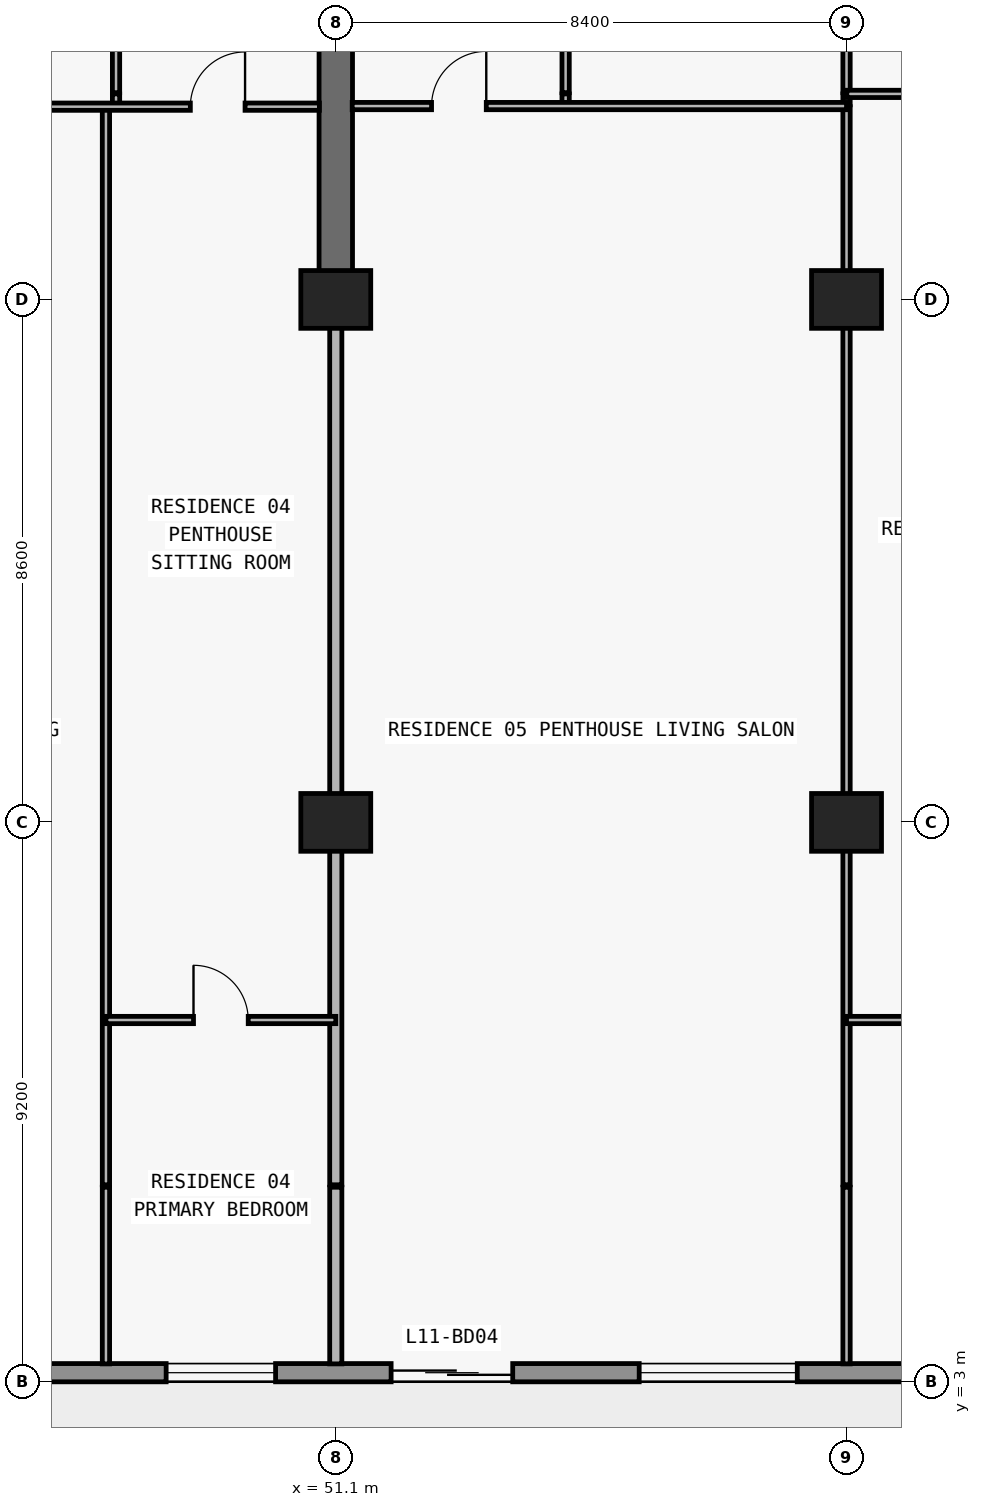
"""IFC4 building model, lengths in metres.
Left out: names, types, materials, properties, quantities, classifications, styles, units other than length and angle.
Written with IfcOpenShell. Run it as: python <this file> out.ifc"""

import sys

from ifc_helpers import new_model, si_unit, direction, frame, frame_2d, origin, origin_2d, place, context, subcontext, project, spatial, rectangle, extrude, element, fill, save


model = new_model("IFC4")
c1 = context("Model", 3, precision=1e-05, world=origin(), true_north=direction((0.0, 1.0)))
c2 = subcontext(c1, "Body", "Model", "MODEL_VIEW")
j1 = project(units=[si_unit("LENGTHUNIT", "METRE"), si_unit("PLANEANGLEUNIT", "RADIAN")], contexts=[c1])
p1 = place(None, origin())
s1 = spatial("IfcSite", under=j1, at=p1, CompositionType="ELEMENT")
p2 = place(p1, origin())
s2 = spatial("IfcBuilding", under=s1, at=p2, CompositionType="ELEMENT")
p3 = place(p2, frame((0.0, 0.0, 46.5)))
s3 = spatial("IfcBuildingStorey", under=s2, at=p3, CompositionType="ELEMENT", Elevation=46.5)
for number, where, z_axis, x_axis in (
    (1, (51.1, 12.2, 0.0), (0.0, 0.0, 1.0), (1.0, 0.0, 0.0)),
    (2, (59.5, 12.2, 0.0), (0.0, 0.0, 1.0), (1.0, 0.0, 0.0)),
    (3, (51.1, 20.8, 0.0), (0.0, 0.0, 1.0), (1.0, 0.0, 0.0)),
    (4, (59.5, 20.8, 0.0), (0.0, 0.0, 1.0), (1.0, 0.0, 0.0)),
):
    element("IfcColumn", number, at=place(p3, frame(where, z_axis=z_axis, x_axis=x_axis)), inside=s3, PredefinedType="COLUMN", context=c2, shape_type="SweptSolid", body=[
        extrude(rectangle(XDim=1.15, YDim=0.95, at=origin_2d()), origin(), (0.0, 0.0, 1.0), 3.05),
    ])
p4 = place(p3, frame((51.1, 20.8, 0.0), z_axis=(0.0, 0.0, 1.0), x_axis=(0.0, 1.0, 0.0)))
e5 = element("IfcWall", 5, at=p4, inside=s3, PredefinedType="SHEAR", context=c2, shape_type="SweptSolid", body=[
    extrude(rectangle(XDim=8.6, YDim=0.55, at=frame_2d((4.3, 0.0))), origin(), (0.0, 0.0, 1.0), 3.05),
])
p5 = place(p3, frame((72.7, 3.15, 0.0), z_axis=(0.0, 0.0, 1.0), x_axis=(-1.0, 0.0, 0.0)))
e6 = element("IfcWall", 6, at=p5, inside=s3, PredefinedType="STANDARD", context=c2, shape_type="SweptSolid", body=[
    extrude(rectangle(XDim=67.6, YDim=0.3, at=frame_2d((33.8, 0.0))), origin(), (0.0, 0.0, 1.0), 3.05),
])
p6 = place(p5, frame((59.89, 0.0, 0.0)))
e7 = element("IfcOpeningElement", 7, at=p6, cuts=e6, PredefinedType="OPENING", context=c2, shape_type="SweptSolid", body=[
    extrude(rectangle(XDim=2.0, YDim=2.3, at=frame_2d((1.0, 1.15))), frame((0.0, 0.16, 0.0), z_axis=(0.0, -1.0, 0.0), x_axis=(1.0, 0.0, 0.0)), (0.0, 0.0, 1.0), 0.32),
])
p7 = place(p5, frame((55.21, 0.0, 0.65)))
e8 = element("IfcOpeningElement", 8, at=p7, cuts=e6, PredefinedType="OPENING", context=c2, shape_type="SweptSolid", body=[
    extrude(rectangle(XDim=2.6, YDim=1.85, at=frame_2d((1.3, 0.925))), frame((0.0, 0.16, 0.0), z_axis=(0.0, -1.0, 0.0), x_axis=(1.0, 0.0, 0.0)), (0.0, 0.0, 1.0), 0.32),
])
p8 = place(p5, frame((49.1, 0.0, 0.85)))
e9 = element("IfcOpeningElement", 9, at=p8, cuts=e6, PredefinedType="OPENING", context=c2, shape_type="SweptSolid", body=[
    extrude(rectangle(XDim=2.2, YDim=1.55, at=frame_2d((1.1, 0.775))), frame((0.0, 0.16, 0.0), z_axis=(0.0, -1.0, 0.0), x_axis=(1.0, 0.0, 0.0)), (0.0, 0.0, 1.0), 0.32),
])
p9 = place(p5, frame((42.69, 0.0, 0.0)))
e10 = element("IfcOpeningElement", 10, at=p9, cuts=e6, PredefinedType="OPENING", context=c2, shape_type="SweptSolid", body=[
    extrude(rectangle(XDim=2.0, YDim=2.3, at=frame_2d((1.0, 1.15))), frame((0.0, 0.16, 0.0), z_axis=(0.0, -1.0, 0.0), x_axis=(1.0, 0.0, 0.0)), (0.0, 0.0, 1.0), 0.32),
])
p10 = place(p5, frame((38.59, 0.0, 0.85)))
e11 = element("IfcOpeningElement", 11, at=p10, cuts=e6, PredefinedType="OPENING", context=c2, shape_type="SweptSolid", body=[
    extrude(rectangle(XDim=1.8, YDim=1.55, at=frame_2d((0.9, 0.775))), frame((0.0, 0.16, 0.0), z_axis=(0.0, -1.0, 0.0), x_axis=(1.0, 0.0, 0.0)), (0.0, 0.0, 1.0), 0.32),
])
p11 = place(p5, frame((30.914, 0.0, 0.85)))
e12 = element("IfcOpeningElement", 12, at=p11, cuts=e6, PredefinedType="OPENING", context=c2, shape_type="SweptSolid", body=[
    extrude(rectangle(XDim=2.2, YDim=1.55, at=frame_2d((1.1, 0.775))), frame((0.0, 0.16, 0.0), z_axis=(0.0, -1.0, 0.0), x_axis=(1.0, 0.0, 0.0)), (0.0, 0.0, 1.0), 0.32),
])
p12 = place(p5, frame((26.69, 0.0, 0.0)))
e13 = element("IfcOpeningElement", 13, at=p12, cuts=e6, PredefinedType="OPENING", context=c2, shape_type="SweptSolid", body=[
    extrude(rectangle(XDim=2.0, YDim=2.3, at=frame_2d((1.0, 1.15))), frame((0.0, 0.16, 0.0), z_axis=(0.0, -1.0, 0.0), x_axis=(1.0, 0.0, 0.0)), (0.0, 0.0, 1.0), 0.32),
])
p13 = place(p5, frame((22.59, 0.0, 0.85)))
e14 = element("IfcOpeningElement", 14, at=p13, cuts=e6, PredefinedType="OPENING", context=c2, shape_type="SweptSolid", body=[
    extrude(rectangle(XDim=1.8, YDim=1.55, at=frame_2d((0.9, 0.775))), frame((0.0, 0.16, 0.0), z_axis=(0.0, -1.0, 0.0), x_axis=(1.0, 0.0, 0.0)), (0.0, 0.0, 1.0), 0.32),
])
p14 = place(p5, frame((18.69, 0.0, 0.0)))
e15 = element("IfcOpeningElement", 15, at=p14, cuts=e6, PredefinedType="OPENING", context=c2, shape_type="SweptSolid", body=[
    extrude(rectangle(XDim=2.0, YDim=2.3, at=frame_2d((1.0, 1.15))), frame((0.0, 0.16, 0.0), z_axis=(0.0, -1.0, 0.0), x_axis=(1.0, 0.0, 0.0)), (0.0, 0.0, 1.0), 0.32),
])
p15 = place(p5, frame((14.01, 0.0, 0.65)))
e16 = element("IfcOpeningElement", 16, at=p15, cuts=e6, PredefinedType="OPENING", context=c2, shape_type="SweptSolid", body=[
    extrude(rectangle(XDim=2.6, YDim=1.85, at=frame_2d((1.3, 0.925))), frame((0.0, 0.16, 0.0), z_axis=(0.0, -1.0, 0.0), x_axis=(1.0, 0.0, 0.0)), (0.0, 0.0, 1.0), 0.32),
])
p16 = place(p5, frame((7.9, 0.0, 0.85)))
e17 = element("IfcOpeningElement", 17, at=p16, cuts=e6, PredefinedType="OPENING", context=c2, shape_type="SweptSolid", body=[
    extrude(rectangle(XDim=2.2, YDim=1.55, at=frame_2d((1.1, 0.775))), frame((0.0, 0.16, 0.0), z_axis=(0.0, -1.0, 0.0), x_axis=(1.0, 0.0, 0.0)), (0.0, 0.0, 1.0), 0.32),
])
p17 = place(p3, frame((47.32, 3.295, 0.0), z_axis=(0.0, 0.0, 1.0), x_axis=(0.0, 1.0, 0.0)))
e18 = element("IfcWall", 18, at=p17, inside=s3, PredefinedType="PARTITIONING", context=c2, shape_type="SweptSolid", body=[
    extrude(rectangle(XDim=2.905, YDim=0.12, at=frame_2d((1.453, 0.0))), origin(), (0.0, 0.0, 1.0), 3.05),
])
p18 = place(p3, frame((47.32, 6.24, 0.0), z_axis=(0.0, 0.0, 1.0), x_axis=(0.0, 1.0, 0.0)))
e19 = element("IfcWall", 19, at=p18, inside=s3, PredefinedType="PARTITIONING", context=c2, shape_type="SweptSolid", body=[
    extrude(rectangle(XDim=17.73, YDim=0.12, at=frame_2d((8.865, 0.0))), origin(), (0.0, 0.0, 1.0), 3.05),
])
p19 = place(p3, frame((47.486, 24.0, 0.0), z_axis=(0.0, 0.0, 1.0), x_axis=(0.0, 1.0, 0.0)))
e20 = element("IfcWall", 20, at=p19, inside=s3, PredefinedType="PARTITIONING", context=c2, shape_type="SweptSolid", body=[
    extrude(rectangle(XDim=0.18, YDim=0.12, at=frame_2d((0.09, 0.0))), origin(), (0.0, 0.0, 1.0), 3.05),
])
p20 = place(p3, frame((47.486, 24.2, 0.0), z_axis=(0.0, 0.0, 1.0), x_axis=(0.0, 1.0, 0.0)))
e21 = element("IfcWall", 21, at=p20, inside=s3, PredefinedType="PARTITIONING", context=c2, shape_type="SweptSolid", body=[
    extrude(rectangle(XDim=4.38, YDim=0.12, at=frame_2d((2.19, 0.0))), origin(), (0.0, 0.0, 1.0), 3.05),
])
p21 = place(p20, frame((1.74, 0.0, 0.0)))
e22 = element("IfcOpeningElement", 22, at=p21, cuts=e21, PredefinedType="OPENING", context=c2, shape_type="SweptSolid", body=[
    extrude(rectangle(XDim=0.9, YDim=2.15, at=frame_2d((0.45, 1.075))), frame((0.0, 0.07, 0.0), z_axis=(0.0, -1.0, 0.0), x_axis=(1.0, 0.0, 0.0)), (0.0, 0.0, 1.0), 0.14),
])
p22 = place(p3, frame((51.1, 3.295, 0.0), z_axis=(0.0, 0.0, 1.0), x_axis=(0.0, 1.0, 0.0)))
e23 = element("IfcWall", 23, at=p22, inside=s3, PredefinedType="PARTITIONING", context=c2, shape_type="SweptSolid", body=[
    extrude(rectangle(XDim=2.905, YDim=0.2, at=frame_2d((1.453, 0.0))), origin(), (0.0, 0.0, 1.0), 3.05),
])
p23 = place(p3, frame((51.1, 6.24, 0.0), z_axis=(0.0, 0.0, 1.0), x_axis=(0.0, 1.0, 0.0)))
e24 = element("IfcWall", 24, at=p23, inside=s3, PredefinedType="PARTITIONING", context=c2, shape_type="SweptSolid", body=[
    extrude(rectangle(XDim=14.555, YDim=0.2, at=frame_2d((7.277, 0.0))), origin(), (0.0, 0.0, 1.0), 2.11),
])
p24 = place(p3, frame((54.88, 24.0, 0.0), z_axis=(0.0, 0.0, 1.0), x_axis=(0.0, 1.0, 0.0)))
e25 = element("IfcWall", 25, at=p24, inside=s3, PredefinedType="PARTITIONING", context=c2, shape_type="SweptSolid", body=[
    extrude(rectangle(XDim=0.18, YDim=0.12, at=frame_2d((0.09, 0.0))), origin(), (0.0, 0.0, 1.0), 3.05),
])
p25 = place(p3, frame((54.88, 24.2, 0.0), z_axis=(0.0, 0.0, 1.0), x_axis=(0.0, 1.0, 0.0)))
e26 = element("IfcWall", 26, at=p25, inside=s3, PredefinedType="PARTITIONING", context=c2, shape_type="SweptSolid", body=[
    extrude(rectangle(XDim=4.38, YDim=0.12, at=frame_2d((2.19, 0.0))), origin(), (0.0, 0.0, 1.0), 3.05),
])
p26 = place(p25, frame((1.74, 0.0, 0.0)))
e27 = element("IfcOpeningElement", 27, at=p26, cuts=e26, PredefinedType="OPENING", context=c2, shape_type="SweptSolid", body=[
    extrude(rectangle(XDim=0.9, YDim=2.15, at=frame_2d((0.45, 1.075))), frame((0.0, 0.07, 0.0), z_axis=(0.0, -1.0, 0.0), x_axis=(1.0, 0.0, 0.0)), (0.0, 0.0, 1.0), 0.14),
])
p27 = place(p3, frame((59.5, 3.295, 0.0), z_axis=(0.0, 0.0, 1.0), x_axis=(0.0, 1.0, 0.0)))
e28 = element("IfcWall", 28, at=p27, inside=s3, PredefinedType="PARTITIONING", context=c2, shape_type="SweptSolid", body=[
    extrude(rectangle(XDim=2.905, YDim=0.12, at=frame_2d((1.453, 0.0))), origin(), (0.0, 0.0, 1.0), 3.05),
])
p28 = place(p3, frame((59.5, 6.24, 0.0), z_axis=(0.0, 0.0, 1.0), x_axis=(0.0, 1.0, 0.0)))
e29 = element("IfcWall", 29, at=p28, inside=s3, PredefinedType="PARTITIONING", context=c2, shape_type="SweptSolid", body=[
    extrude(rectangle(XDim=17.73, YDim=0.12, at=frame_2d((8.865, 0.0))), origin(), (0.0, 0.0, 1.0), 2.11),
])
p29 = place(p3, frame((59.5, 24.0, 0.0), z_axis=(0.0, 0.0, 1.0), x_axis=(0.0, 1.0, 0.0)))
e30 = element("IfcWall", 30, at=p29, inside=s3, PredefinedType="PARTITIONING", context=c2, shape_type="SweptSolid", body=[
    extrude(rectangle(XDim=0.18, YDim=0.12, at=frame_2d((0.09, 0.0))), origin(), (0.0, 0.0, 1.0), 2.11),
])
p30 = place(p3, frame((59.5, 24.2, 0.0), z_axis=(0.0, 0.0, 1.0), x_axis=(0.0, 1.0, 0.0)))
e31 = element("IfcWall", 31, at=p30, inside=s3, PredefinedType="PARTITIONING", context=c2, shape_type="SweptSolid", body=[
    extrude(rectangle(XDim=4.38, YDim=0.12, at=frame_2d((2.19, 0.0))), origin(), (0.0, 0.0, 1.0), 2.11),
])
p31 = place(p30, frame((1.74, 0.0, 0.0)))
e32 = element("IfcOpeningElement", 32, at=p31, cuts=e31, PredefinedType="OPENING", context=c2, shape_type="SweptSolid", body=[
    extrude(rectangle(XDim=0.9, YDim=2.06, at=frame_2d((0.45, 1.03))), frame((0.0, 0.07, 0.0), z_axis=(0.0, -1.0, 0.0), x_axis=(1.0, 0.0, 0.0)), (0.0, 0.0, 1.0), 0.14),
])
p32 = place(p3, frame((47.32, 8.95, 0.0), z_axis=(0.0, 0.0, 1.0), x_axis=(1.0, 0.0, 0.0)))
e33 = element("IfcWall", 33, at=p32, inside=s3, PredefinedType="PARTITIONING", context=c2, shape_type="SweptSolid", body=[
    extrude(rectangle(XDim=3.78, YDim=0.12, at=frame_2d((1.89, 0.0))), origin(), (0.0, 0.0, 1.0), 3.05),
])
p33 = place(p32, frame((1.44, 0.0, 0.0)))
e34 = element("IfcOpeningElement", 34, at=p33, cuts=e33, PredefinedType="OPENING", context=c2, shape_type="SweptSolid", body=[
    extrude(rectangle(XDim=0.9, YDim=2.15, at=frame_2d((0.45, 1.075))), frame((0.0, 0.07, 0.0), z_axis=(0.0, -1.0, 0.0), x_axis=(1.0, 0.0, 0.0)), (0.0, 0.0, 1.0), 0.14),
])
p34 = place(p3, frame((59.5, 8.95, 0.0), z_axis=(0.0, 0.0, 1.0), x_axis=(1.0, 0.0, 0.0)))
e35 = element("IfcWall", 35, at=p34, inside=s3, PredefinedType="PARTITIONING", context=c2, shape_type="SweptSolid", body=[
    extrude(rectangle(XDim=8.4, YDim=0.12, at=frame_2d((4.2, 0.0))), origin(), (0.0, 0.0, 1.0), 3.05),
])
p35 = place(p34, frame((3.75, 0.0, 0.0)))
e36 = element("IfcOpeningElement", 36, at=p35, cuts=e35, PredefinedType="OPENING", context=c2, shape_type="SweptSolid", body=[
    extrude(rectangle(XDim=0.9, YDim=2.15, at=frame_2d((0.45, 1.075))), frame((0.0, 0.07, 0.0), z_axis=(0.0, -1.0, 0.0), x_axis=(1.0, 0.0, 0.0)), (0.0, 0.0, 1.0), 0.14),
])
p36 = place(p3, frame((42.7, 23.97, 0.0), z_axis=(0.0, 0.0, 1.0), x_axis=(1.0, 0.0, 0.0)))
e37 = element("IfcWall", 37, at=p36, inside=s3, PredefinedType="PARTITIONING", context=c2, shape_type="SweptSolid", body=[
    extrude(rectangle(XDim=8.13, YDim=0.12, at=frame_2d((4.065, 0.0))), origin(), (0.0, 0.0, 1.0), 3.05),
])
p37 = place(p36, frame((1.86, 0.0, 0.0)))
e38 = element("IfcOpeningElement", 38, at=p37, cuts=e37, PredefinedType="OPENING", context=c2, shape_type="SweptSolid", body=[
    extrude(rectangle(XDim=0.9, YDim=2.15, at=frame_2d((0.45, 1.075))), frame((0.0, 0.07, 0.0), z_axis=(0.0, -1.0, 0.0), x_axis=(1.0, 0.0, 0.0)), (0.0, 0.0, 1.0), 0.14),
])
p38 = place(p36, frame((6.008, 0.0, 0.0)))
e39 = element("IfcOpeningElement", 39, at=p38, cuts=e37, PredefinedType="OPENING", context=c2, shape_type="SweptSolid", body=[
    extrude(rectangle(XDim=0.9, YDim=2.15, at=frame_2d((0.45, 1.075))), frame((0.0, 0.07, 0.0), z_axis=(0.0, -1.0, 0.0), x_axis=(1.0, 0.0, 0.0)), (0.0, 0.0, 1.0), 0.14),
])
p39 = place(p3, frame((51.37, 23.98, 0.0), z_axis=(0.0, 0.0, 1.0), x_axis=(1.0, 0.0, 0.0)))
e40 = element("IfcWall", 40, at=p39, inside=s3, PredefinedType="PARTITIONING", context=c2, shape_type="SweptSolid", body=[
    extrude(rectangle(XDim=8.13, YDim=0.12, at=frame_2d((4.065, 0.0))), origin(), (0.0, 0.0, 1.0), 3.05),
])
p40 = place(p39, frame((1.305, 0.0, 0.0)))
e41 = element("IfcOpeningElement", 41, at=p40, cuts=e40, PredefinedType="OPENING", context=c2, shape_type="SweptSolid", body=[
    extrude(rectangle(XDim=0.9, YDim=2.15, at=frame_2d((0.45, 1.075))), frame((0.0, 0.07, 0.0), z_axis=(0.0, -1.0, 0.0), x_axis=(1.0, 0.0, 0.0)), (0.0, 0.0, 1.0), 0.14),
])
p41 = place(p3, frame((59.505, 24.18, 0.0), z_axis=(0.0, 0.0, 1.0), x_axis=(1.0, 0.0, 0.0)))
e42 = element("IfcWall", 42, at=p41, inside=s3, PredefinedType="PARTITIONING", context=c2, shape_type="SweptSolid", body=[
    extrude(rectangle(XDim=8.395, YDim=0.12, at=frame_2d((4.198, 0.0))), origin(), (0.0, 0.0, 1.0), 3.05),
])
p42 = place(p41, frame((3.748, 0.0, 0.0)))
e43 = element("IfcOpeningElement", 43, at=p42, cuts=e42, PredefinedType="OPENING", context=c2, shape_type="SweptSolid", body=[
    extrude(rectangle(XDim=0.9, YDim=2.15, at=frame_2d((0.45, 1.075))), frame((0.0, 0.07, 0.0), z_axis=(0.0, -1.0, 0.0), x_axis=(1.0, 0.0, 0.0)), (0.0, 0.0, 1.0), 0.14),
])
p43 = place(p13, origin())
e44 = element("IfcWindow", 44, at=p43, inside=s3, PartitioningType="SINGLE_PANEL", PredefinedType="WINDOW", context=c2, shape_type="SweptSolid", body=[
    extrude(rectangle(XDim=1.8, YDim=1.55, at=frame_2d((0.9, 0.775))), frame((0.0, 0.03, 0.0), z_axis=(0.0, -1.0, 0.0), x_axis=(1.0, 0.0, 0.0)), (0.0, 0.0, 1.0), 0.06),
])
fill(e14, e44)
p44 = place(p14, origin())
e45 = element("IfcDoor", 45, at=p44, inside=s3, OperationType="DOUBLE_DOOR_SLIDING", PredefinedType="DOOR", context=c2, shape_type="SweptSolid", body=[
    extrude(rectangle(XDim=2.0, YDim=2.3, at=frame_2d((1.0, 1.15))), frame((0.0, 0.025, 0.0), z_axis=(0.0, -1.0, 0.0), x_axis=(1.0, 0.0, 0.0)), (0.0, 0.0, 1.0), 0.05),
])
fill(e15, e45)
p45 = place(p15, origin())
e46 = element("IfcWindow", 46, at=p45, inside=s3, PartitioningType="SINGLE_PANEL", PredefinedType="WINDOW", context=c2, shape_type="SweptSolid", body=[
    extrude(rectangle(XDim=2.6, YDim=1.85, at=frame_2d((1.3, 0.925))), frame((0.0, 0.03, 0.0), z_axis=(0.0, -1.0, 0.0), x_axis=(1.0, 0.0, 0.0)), (0.0, 0.0, 1.0), 0.06),
])
fill(e16, e46)
p46 = place(p38, origin())
e47 = element("IfcDoor", 47, at=p46, inside=s3, OperationType="SINGLE_SWING_RIGHT", PredefinedType="DOOR", context=c2, shape_type="SweptSolid", body=[
    extrude(rectangle(XDim=0.9, YDim=2.15, at=frame_2d((0.45, 1.075))), frame((0.0, 0.025, 0.0), z_axis=(0.0, -1.0, 0.0), x_axis=(1.0, 0.0, 0.0)), (0.0, 0.0, 1.0), 0.05),
])
fill(e39, e47)
p47 = place(p33, origin())
e48 = element("IfcDoor", 48, at=p47, inside=s3, OperationType="SINGLE_SWING_LEFT", PredefinedType="DOOR", context=c2, shape_type="SweptSolid", body=[
    extrude(rectangle(XDim=0.9, YDim=2.15, at=frame_2d((0.45, 1.075))), frame((0.0, 0.025, 0.0), z_axis=(0.0, -1.0, 0.0), x_axis=(1.0, 0.0, 0.0)), (0.0, 0.0, 1.0), 0.05),
])
fill(e34, e48)
p48 = place(p40, origin())
e49 = element("IfcDoor", 49, at=p48, inside=s3, OperationType="SINGLE_SWING_RIGHT", PredefinedType="DOOR", context=c2, shape_type="SweptSolid", body=[
    extrude(rectangle(XDim=0.9, YDim=2.15, at=frame_2d((0.45, 1.075))), frame((0.0, 0.025, 0.0), z_axis=(0.0, -1.0, 0.0), x_axis=(1.0, 0.0, 0.0)), (0.0, 0.0, 1.0), 0.05),
])
fill(e41, e49)
save(model, sys.argv[1])
